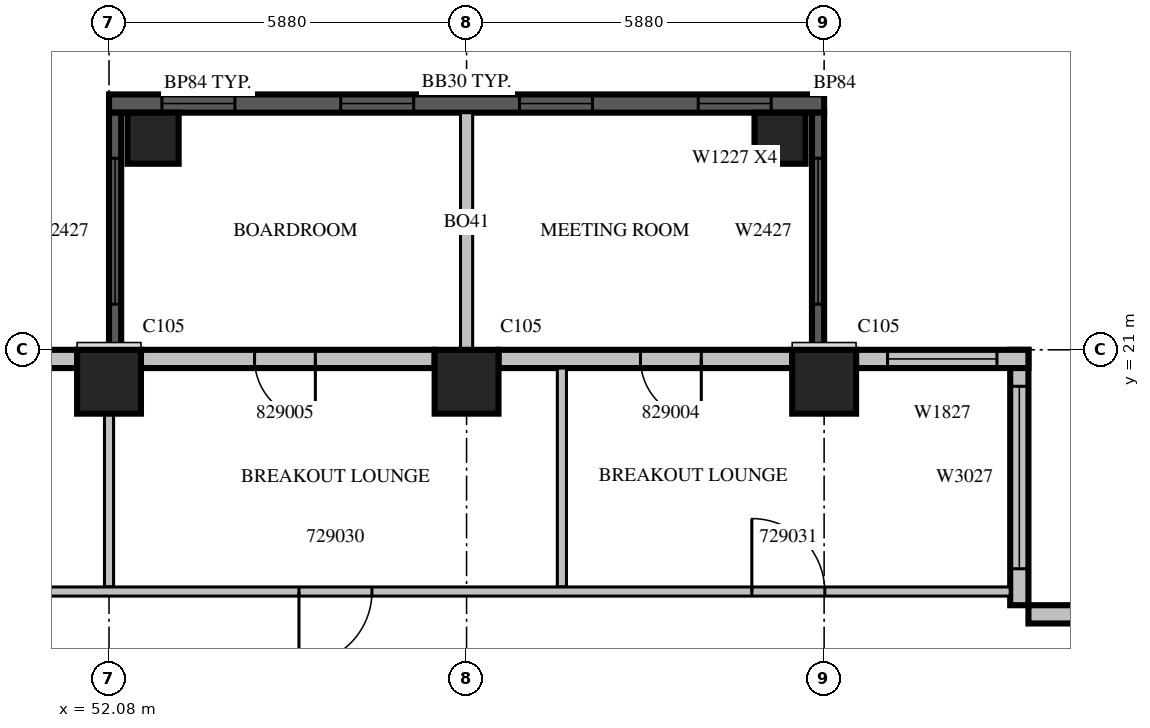
"""IFC4 building model, lengths in metres.
Left out: names, types, materials, properties, quantities, classifications, styles, units other than length and angle.
Written with IfcOpenShell. Run it as: python <this file> out.ifc"""

import sys

from ifc_helpers import new_model, si_unit, direction, frame, frame_2d, origin, origin_2d, place, context, subcontext, project, spatial, rectangle, extrude, source, transform, mapped, element, fill, save


model = new_model("IFC4")
c1 = context("Model", 3, precision=1e-05, world=origin(), true_north=direction((0.0, 1.0)))
c2 = subcontext(c1, "Body", "Model", "MODEL_VIEW")
j1 = project(units=[si_unit("LENGTHUNIT", "METRE"), si_unit("PLANEANGLEUNIT", "RADIAN")], contexts=[c1])
p1 = place(None, origin())
s1 = spatial("IfcSite", under=j1, at=p1, CompositionType="ELEMENT")
p2 = place(p1, origin())
s2 = spatial("IfcBuilding", under=s1, at=p2, CompositionType="ELEMENT")
p3 = place(p2, frame((0.0, 0.0, 132.9)))
s3 = spatial("IfcBuildingStorey", under=s2, at=p3, CompositionType="ELEMENT", Elevation=132.9)
m1 = source(origin(), c2, "Body", "SweptSolid", [
    extrude(rectangle(XDim=1.05, YDim=1.05, at=origin_2d()), origin(), (0.0, 0.0, 1.0), 4.2),
])
for number, where, z_axis, x_axis in (
    (1, (52.08, 20.475, 0.0), (0.0, 0.0, 1.0), (1.0, 0.0, 0.0)),
    (2, (57.96, 20.475, 0.0), (0.0, 0.0, 1.0), (1.0, 0.0, 0.0)),
    (3, (63.84, 20.475, 0.0), (0.0, 0.0, 1.0), (1.0, 0.0, 0.0)),
):
    element("IfcColumn", number, at=place(p3, frame(where, z_axis=z_axis, x_axis=x_axis)), inside=s3, PredefinedType="COLUMN", context=c2, shape_type="MappedRepresentation", body=[
        mapped(m1, transform((0.0, 0.0, 0.0), scale=1.0)),
    ])
m2 = source(origin(), c2, "Body", "SweptSolid", [
    extrude(rectangle(XDim=0.84, YDim=0.84, at=origin_2d()), origin(), (0.0, 0.0, 1.0), 4.2),
])
for number, where, z_axis, x_axis in (
    (4, (52.805, 24.48, 0.0), (0.0, 0.0, 1.0), (1.0, 0.0, 0.0)),
    (5, (63.115, 24.48, 0.0), (0.0, 0.0, 1.0), (1.0, 0.0, 0.0)),
):
    element("IfcColumn", number, at=place(p3, frame(where, z_axis=z_axis, x_axis=x_axis)), inside=s3, PredefinedType="COLUMN", context=c2, shape_type="MappedRepresentation", body=[
        mapped(m2, transform((0.0, 0.0, 0.0), scale=1.0)),
    ])
m3 = source(origin(), c2, "Body", "SweptSolid", [
    extrude(rectangle(XDim=11.76, YDim=0.3, at=frame_2d((5.88, 0.0))), origin(), (0.0, 0.0, 1.0), 3.79),
])
p4 = place(p3, frame((63.84, 25.05, 0.0), z_axis=(0.0, 0.0, 1.0), x_axis=(-1.0, 0.0, 0.0)))
e6 = element("IfcWall", 6, at=p4, inside=s3, PredefinedType="SOLIDWALL", context=c2, shape_type="MappedRepresentation", body=[
    mapped(m3, transform((0.0, 0.0, 0.0), scale=1.0)),
])
m4 = source(origin(), c2, "Body", "SweptSolid", [
    extrude(rectangle(XDim=1.2, YDim=2.7, at=frame_2d((0.6, 1.35))), frame((0.0, 0.16, 0.0), z_axis=(0.0, -1.0, 0.0), x_axis=(1.0, 0.0, 0.0)), (0.0, 0.0, 1.0), 0.32),
])
p5 = place(p4, frame((0.87, 0.0, 0.6)))
e7 = element("IfcOpeningElement", 7, at=p5, cuts=e6, PredefinedType="OPENING", context=c2, shape_type="MappedRepresentation", body=[
    mapped(m4, transform((0.0, 0.0, 0.0), scale=1.0)),
])
p6 = place(p4, frame((3.81, 0.0, 0.6)))
e8 = element("IfcOpeningElement", 8, at=p6, cuts=e6, PredefinedType="OPENING", context=c2, shape_type="MappedRepresentation", body=[
    mapped(m4, transform((0.0, 0.0, 0.0), scale=1.0)),
])
p7 = place(p4, frame((6.75, 0.0, 0.6)))
e9 = element("IfcOpeningElement", 9, at=p7, cuts=e6, PredefinedType="OPENING", context=c2, shape_type="MappedRepresentation", body=[
    mapped(m4, transform((0.0, 0.0, 0.0), scale=1.0)),
])
p8 = place(p4, frame((9.69, 0.0, 0.6)))
e10 = element("IfcOpeningElement", 10, at=p8, cuts=e6, PredefinedType="OPENING", context=c2, shape_type="MappedRepresentation", body=[
    mapped(m4, transform((0.0, 0.0, 0.0), scale=1.0)),
])
m5 = source(origin(), c2, "Body", "SweptSolid", [
    extrude(rectangle(XDim=3.9, YDim=0.2, at=frame_2d((1.95, 0.0))), origin(), (0.0, 0.0, 1.0), 3.79),
])
p9 = place(p3, frame((57.96, 21.0, 0.0), z_axis=(0.0, 0.0, 1.0), x_axis=(0.0, 1.0, 0.0)))
e11 = element("IfcWall", 11, at=p9, inside=s3, PredefinedType="SOLIDWALL", context=c2, shape_type="MappedRepresentation", body=[
    mapped(m5, transform((0.0, 0.0, 0.0), scale=1.0)),
])
m6 = source(origin(), c2, "Body", "SweptSolid", [
    extrude(rectangle(XDim=3.9, YDim=0.2, at=frame_2d((1.95, 0.0))), origin(), (0.0, 0.0, 1.0), 3.79),
])
p10 = place(p3, frame((63.74, 21.0, 0.0), z_axis=(0.0, 0.0, 1.0), x_axis=(0.0, 1.0, 0.0)))
e12 = element("IfcWall", 12, at=p10, inside=s3, PredefinedType="SOLIDWALL", context=c2, shape_type="MappedRepresentation", body=[
    mapped(m6, transform((0.0, 0.0, 0.0), scale=1.0)),
])
m7 = source(origin(), c2, "Body", "SweptSolid", [
    extrude(rectangle(XDim=2.4, YDim=2.7, at=frame_2d((1.2, 1.35))), frame((0.0, 0.11, 0.0), z_axis=(0.0, -1.0, 0.0), x_axis=(1.0, 0.0, 0.0)), (0.0, 0.0, 1.0), 0.22),
])
p11 = place(p10, frame((0.75, 0.0, 0.6)))
e13 = element("IfcOpeningElement", 13, at=p11, cuts=e12, PredefinedType="OPENING", context=c2, shape_type="MappedRepresentation", body=[
    mapped(m7, transform((0.0, 0.0, 0.0), scale=1.0)),
])
p12 = place(p3, frame((52.18, 21.0, 0.0), z_axis=(0.0, 0.0, 1.0), x_axis=(0.0, 1.0, 0.0)))
e14 = element("IfcWall", 14, at=p12, inside=s3, PredefinedType="SOLIDWALL", context=c2, shape_type="MappedRepresentation", body=[
    mapped(m6, transform((0.0, 0.0, 0.0), scale=1.0)),
])
p13 = place(p12, frame((0.75, 0.0, 0.6)))
e15 = element("IfcOpeningElement", 15, at=p13, cuts=e14, PredefinedType="OPENING", context=c2, shape_type="MappedRepresentation", body=[
    mapped(m7, transform((0.0, 0.0, 0.0), scale=1.0)),
])
m8 = source(origin(), c2, "Body", "SweptSolid", [
    extrude(rectangle(XDim=4.2, YDim=0.3, at=frame_2d((2.1, 0.0))), origin(), (0.0, 0.0, 1.0), 3.8),
])
p14 = place(p3, frame((71.4, 16.65, 0.0), z_axis=(0.0, 0.0, 1.0), x_axis=(-1.0, 0.0, 0.0)))
e16 = element("IfcWall", 16, at=p14, inside=s3, PredefinedType="STANDARD", context=c2, shape_type="MappedRepresentation", body=[
    mapped(m8, transform((0.0, 0.0, 0.0), scale=1.0)),
])
p15 = place(p14, frame((0.66, 0.0, 0.6)))
e17 = element("IfcOpeningElement", 17, at=p15, cuts=e16, PredefinedType="OPENING", context=c2, shape_type="MappedRepresentation", body=[
    mapped(m4, transform((0.0, 0.0, 0.0), scale=1.0)),
])
p16 = place(p3, frame((67.05, 16.8, 0.0), z_axis=(0.0, 0.0, 1.0), x_axis=(0.0, 1.0, 0.0)))
e18 = element("IfcWall", 18, at=p16, inside=s3, PredefinedType="STANDARD", context=c2, shape_type="MappedRepresentation", body=[
    mapped(m8, transform((0.0, 0.0, 0.0), scale=1.0)),
])
m9 = source(origin(), c2, "Body", "SweptSolid", [
    extrude(rectangle(XDim=3.0, YDim=2.7, at=frame_2d((1.5, 1.35))), frame((0.0, 0.16, 0.0), z_axis=(0.0, -1.0, 0.0), x_axis=(1.0, 0.0, 0.0)), (0.0, 0.0, 1.0), 0.32),
])
p17 = place(p16, frame((0.6, 0.0, 0.6)))
e19 = element("IfcOpeningElement", 19, at=p17, cuts=e18, PredefinedType="OPENING", context=c2, shape_type="MappedRepresentation", body=[
    mapped(m9, transform((0.0, 0.0, 0.0), scale=1.0)),
])
m10 = source(origin(), c2, "Body", "SweptSolid", [
    extrude(rectangle(XDim=2.835, YDim=0.3, at=frame_2d((1.417, 0.0))), origin(), (0.0, 0.0, 1.0), 3.8),
])
p18 = place(p3, frame((67.2, 20.85, 0.0), z_axis=(0.0, 0.0, 1.0), x_axis=(-1.0, 0.0, 0.0)))
e20 = element("IfcWall", 20, at=p18, inside=s3, PredefinedType="STANDARD", context=c2, shape_type="MappedRepresentation", body=[
    mapped(m10, transform((0.0, 0.0, 0.0), scale=1.0)),
])
m11 = source(origin(), c2, "Body", "SweptSolid", [
    extrude(rectangle(XDim=1.8, YDim=2.7, at=frame_2d((0.9, 1.35))), frame((0.0, 0.16, 0.0), z_axis=(0.0, -1.0, 0.0), x_axis=(1.0, 0.0, 0.0)), (0.0, 0.0, 1.0), 0.32),
])
p19 = place(p18, frame((0.517, 0.0, 0.6)))
e21 = element("IfcOpeningElement", 21, at=p19, cuts=e20, PredefinedType="OPENING", context=c2, shape_type="MappedRepresentation", body=[
    mapped(m11, transform((0.0, 0.0, 0.0), scale=1.0)),
])
m12 = source(origin(), c2, "Body", "SweptSolid", [
    extrude(rectangle(XDim=4.83, YDim=0.3, at=frame_2d((2.415, 0.0))), origin(), (0.0, 0.0, 1.0), 3.8),
])
p20 = place(p3, frame((63.315, 20.85, 0.0), z_axis=(0.0, 0.0, 1.0), x_axis=(-1.0, 0.0, 0.0)))
e22 = element("IfcWall", 22, at=p20, inside=s3, PredefinedType="STANDARD", context=c2, shape_type="MappedRepresentation", body=[
    mapped(m12, transform((0.0, 0.0, 0.0), scale=1.0)),
])
m13 = source(origin(), c2, "Body", "SweptSolid", [
    extrude(rectangle(XDim=1.0, YDim=2.1, at=frame_2d((0.5, 1.05))), frame((0.0, 0.16, 0.0), z_axis=(0.0, -1.0, 0.0), x_axis=(1.0, 0.0, 0.0)), (0.0, 0.0, 1.0), 0.32),
])
p21 = place(p20, frame((1.495, 0.0, 0.0)))
e23 = element("IfcOpeningElement", 23, at=p21, cuts=e22, PredefinedType="OPENING", context=c2, shape_type="MappedRepresentation", body=[
    mapped(m13, transform((0.0, 0.0, 0.0), scale=1.0)),
])
p22 = place(p3, frame((57.435, 20.85, 0.0), z_axis=(0.0, 0.0, 1.0), x_axis=(-1.0, 0.0, 0.0)))
e24 = element("IfcWall", 24, at=p22, inside=s3, PredefinedType="STANDARD", context=c2, shape_type="MappedRepresentation", body=[
    mapped(m12, transform((0.0, 0.0, 0.0), scale=1.0)),
])
p23 = place(p22, frame((1.962, 0.0, 0.0)))
e25 = element("IfcOpeningElement", 25, at=p23, cuts=e24, PredefinedType="OPENING", context=c2, shape_type="MappedRepresentation", body=[
    mapped(m13, transform((0.0, 0.0, 0.0), scale=1.0)),
])
p24 = place(p3, frame((51.555, 20.85, 0.0), z_axis=(0.0, 0.0, 1.0), x_axis=(-1.0, 0.0, 0.0)))
e26 = element("IfcWall", 26, at=p24, inside=s3, PredefinedType="STANDARD", context=c2, shape_type="MappedRepresentation", body=[
    mapped(m12, transform((0.0, 0.0, 0.0), scale=1.0)),
])
p25 = place(p24, frame((2.297, 0.0, 0.6)))
e27 = element("IfcOpeningElement", 27, at=p25, cuts=e26, PredefinedType="OPENING", context=c2, shape_type="MappedRepresentation", body=[
    mapped(m11, transform((0.0, 0.0, 0.0), scale=1.0)),
])
m14 = source(origin(), c2, "Body", "SweptSolid", [
    extrude(rectangle(XDim=3.6, YDim=0.15, at=frame_2d((1.8, 0.0))), origin(), (0.0, 0.0, 1.0), 3.8),
])
p26 = place(p3, frame((59.528, 20.7, 0.0), z_axis=(0.0, 0.0, 1.0), x_axis=(0.0, -1.0, 0.0)))
e28 = element("IfcWall", 28, at=p26, inside=s3, PredefinedType="PARTITIONING", context=c2, shape_type="MappedRepresentation", body=[
    mapped(m14, transform((0.0, 0.0, 0.0), scale=1.0)),
])
m15 = source(origin(), c2, "Body", "SweptSolid", [
    extrude(rectangle(XDim=2.851, YDim=0.15, at=frame_2d((1.425, 0.0))), origin(), (0.0, 0.0, 1.0), 3.8),
])
p27 = place(p3, frame((52.08, 17.1, 0.0), z_axis=(0.0, 0.0, 1.0), x_axis=(0.0, 1.0, 0.0)))
e29 = element("IfcWall", 29, at=p27, inside=s3, PredefinedType="PARTITIONING", context=c2, shape_type="MappedRepresentation", body=[
    mapped(m15, transform((0.0, 0.0, 0.0), scale=1.0)),
])
m16 = source(origin(), c2, "Body", "SweptSolid", [
    extrude(rectangle(XDim=37.5, YDim=0.15, at=frame_2d((18.75, 0.0))), origin(), (0.0, 0.0, 1.0), 3.3),
])
p28 = place(p3, frame((29.4, 17.025, 0.0), z_axis=(0.0, 0.0, 1.0), x_axis=(1.0, 0.0, 0.0)))
e30 = element("IfcWall", 30, at=p28, inside=s3, PredefinedType="PARTITIONING", context=c2, shape_type="MappedRepresentation", body=[
    mapped(m16, transform((0.0, 0.0, 0.0), scale=1.0)),
])
m17 = source(origin(), c2, "Body", "SweptSolid", [
    extrude(rectangle(XDim=1.0, YDim=2.1, at=frame_2d((0.5, 1.05))), frame((0.0, 0.085, 0.0), z_axis=(0.0, -1.0, 0.0), x_axis=(1.0, 0.0, 0.0)), (0.0, 0.0, 1.0), 0.17),
])
p29 = place(p28, frame((1.357, 0.0, 0.0)))
e31 = element("IfcOpeningElement", 31, at=p29, cuts=e30, PredefinedType="OPENING", context=c2, shape_type="MappedRepresentation", body=[
    mapped(m17, transform((0.0, 0.0, 0.0), scale=1.0)),
])
p30 = place(p28, frame((4.669, 0.0, 0.0)))
e32 = element("IfcOpeningElement", 32, at=p30, cuts=e30, PredefinedType="OPENING", context=c2, shape_type="MappedRepresentation", body=[
    mapped(m17, transform((0.0, 0.0, 0.0), scale=1.0)),
])
p31 = place(p28, frame((7.012, 0.0, 0.0)))
e33 = element("IfcOpeningElement", 33, at=p31, cuts=e30, PredefinedType="OPENING", context=c2, shape_type="MappedRepresentation", body=[
    mapped(m17, transform((0.0, 0.0, 0.0), scale=1.0)),
])
m18 = source(origin(), c2, "Body", "SweptSolid", [
    extrude(rectangle(XDim=0.9, YDim=2.1, at=frame_2d((0.45, 1.05))), frame((0.0, 0.085, 0.0), z_axis=(0.0, -1.0, 0.0), x_axis=(1.0, 0.0, 0.0)), (0.0, 0.0, 1.0), 0.17),
])
p32 = place(p28, frame((9.158, 0.0, 0.0)))
e34 = element("IfcOpeningElement", 34, at=p32, cuts=e30, PredefinedType="OPENING", context=c2, shape_type="MappedRepresentation", body=[
    mapped(m18, transform((0.0, 0.0, 0.0), scale=1.0)),
])
p33 = place(p28, frame((11.258, 0.0, 0.0)))
e35 = element("IfcOpeningElement", 35, at=p33, cuts=e30, PredefinedType="OPENING", context=c2, shape_type="MappedRepresentation", body=[
    mapped(m18, transform((0.0, 0.0, 0.0), scale=1.0)),
])
m19 = source(origin(), c2, "Body", "SweptSolid", [
    extrude(rectangle(XDim=1.2, YDim=2.1, at=frame_2d((0.6, 1.05))), frame((0.0, 0.085, 0.0), z_axis=(0.0, -1.0, 0.0), x_axis=(1.0, 0.0, 0.0)), (0.0, 0.0, 1.0), 0.17),
])
p34 = place(p28, frame((14.52, 0.0, 0.0)))
e36 = element("IfcOpeningElement", 36, at=p34, cuts=e30, PredefinedType="OPENING", context=c2, shape_type="MappedRepresentation", body=[
    mapped(m19, transform((0.0, 0.0, 0.0), scale=1.0)),
])
p35 = place(p28, frame((19.56, 0.0, 0.0)))
e37 = element("IfcOpeningElement", 37, at=p35, cuts=e30, PredefinedType="OPENING", context=c2, shape_type="MappedRepresentation", body=[
    mapped(m19, transform((0.0, 0.0, 0.0), scale=1.0)),
])
p36 = place(p28, frame((25.804, 0.0, 0.0)))
e38 = element("IfcOpeningElement", 38, at=p36, cuts=e30, PredefinedType="OPENING", context=c2, shape_type="MappedRepresentation", body=[
    mapped(m19, transform((0.0, 0.0, 0.0), scale=1.0)),
])
p37 = place(p28, frame((33.251, 0.0, 0.0)))
e39 = element("IfcOpeningElement", 39, at=p37, cuts=e30, PredefinedType="OPENING", context=c2, shape_type="MappedRepresentation", body=[
    mapped(m19, transform((0.0, 0.0, 0.0), scale=1.0)),
])
m20 = source(origin(), c2, "Body", "SweptSolid", [
    extrude(rectangle(XDim=1.2, YDim=2.7, at=frame_2d((0.6, 1.35))), frame((0.0, 0.03, 0.0), z_axis=(0.0, -1.0, 0.0), x_axis=(1.0, 0.0, 0.0)), (0.0, 0.0, 1.0), 0.06),
])
p38 = place(p5, origin())
e40 = element("IfcWindow", 40, at=p38, inside=s3, PartitioningType="SINGLE_PANEL", PredefinedType="WINDOW", context=c2, shape_type="MappedRepresentation", body=[
    mapped(m20, transform((0.0, 0.0, 0.0), scale=1.0)),
])
fill(e7, e40)
p39 = place(p6, origin())
e41 = element("IfcWindow", 41, at=p39, inside=s3, PartitioningType="SINGLE_PANEL", PredefinedType="WINDOW", context=c2, shape_type="MappedRepresentation", body=[
    mapped(m20, transform((0.0, 0.0, 0.0), scale=1.0)),
])
fill(e8, e41)
p40 = place(p7, origin())
e42 = element("IfcWindow", 42, at=p40, inside=s3, PartitioningType="SINGLE_PANEL", PredefinedType="WINDOW", context=c2, shape_type="MappedRepresentation", body=[
    mapped(m20, transform((0.0, 0.0, 0.0), scale=1.0)),
])
fill(e9, e42)
p41 = place(p8, origin())
e43 = element("IfcWindow", 43, at=p41, inside=s3, PartitioningType="SINGLE_PANEL", PredefinedType="WINDOW", context=c2, shape_type="MappedRepresentation", body=[
    mapped(m20, transform((0.0, 0.0, 0.0), scale=1.0)),
])
fill(e10, e43)
m21 = source(origin(), c2, "Body", "SweptSolid", [
    extrude(rectangle(XDim=2.4, YDim=2.7, at=frame_2d((1.2, 1.35))), frame((0.0, 0.03, 0.0), z_axis=(0.0, -1.0, 0.0), x_axis=(1.0, 0.0, 0.0)), (0.0, 0.0, 1.0), 0.06),
])
p42 = place(p11, origin())
e44 = element("IfcWindow", 44, at=p42, inside=s3, PartitioningType="SINGLE_PANEL", PredefinedType="WINDOW", context=c2, shape_type="MappedRepresentation", body=[
    mapped(m21, transform((0.0, 0.0, 0.0), scale=1.0)),
])
fill(e13, e44)
p43 = place(p13, origin())
e45 = element("IfcWindow", 45, at=p43, inside=s3, PartitioningType="SINGLE_PANEL", PredefinedType="WINDOW", context=c2, shape_type="MappedRepresentation", body=[
    mapped(m21, transform((0.0, 0.0, 0.0), scale=1.0)),
])
fill(e15, e45)
m22 = source(origin(), c2, "Body", "SweptSolid", [
    extrude(rectangle(XDim=3.0, YDim=2.7, at=frame_2d((1.5, 1.35))), frame((0.0, 0.03, 0.0), z_axis=(0.0, -1.0, 0.0), x_axis=(1.0, 0.0, 0.0)), (0.0, 0.0, 1.0), 0.06),
])
p44 = place(p17, origin())
e46 = element("IfcWindow", 46, at=p44, inside=s3, PartitioningType="SINGLE_PANEL", PredefinedType="WINDOW", context=c2, shape_type="MappedRepresentation", body=[
    mapped(m22, transform((0.0, 0.0, 0.0), scale=1.0)),
])
fill(e19, e46)
m23 = source(origin(), c2, "Body", "SweptSolid", [
    extrude(rectangle(XDim=1.8, YDim=2.7, at=frame_2d((0.9, 1.35))), frame((0.0, 0.03, 0.0), z_axis=(0.0, -1.0, 0.0), x_axis=(1.0, 0.0, 0.0)), (0.0, 0.0, 1.0), 0.06),
])
p45 = place(p19, origin())
e47 = element("IfcWindow", 47, at=p45, inside=s3, PartitioningType="SINGLE_PANEL", PredefinedType="WINDOW", context=c2, shape_type="MappedRepresentation", body=[
    mapped(m23, transform((0.0, 0.0, 0.0), scale=1.0)),
])
fill(e21, e47)
m24 = source(origin(), c2, "Body", "SweptSolid", [
    extrude(rectangle(XDim=1.2, YDim=2.1, at=frame_2d((0.6, 1.05))), frame((0.0, 0.025, 0.0), z_axis=(0.0, -1.0, 0.0), x_axis=(1.0, 0.0, 0.0)), (0.0, 0.0, 1.0), 0.05),
])
p46 = place(p36, origin())
e48 = element("IfcDoor", 48, at=p46, inside=s3, OperationType="SINGLE_SWING_RIGHT", PredefinedType="DOOR", context=c2, shape_type="MappedRepresentation", body=[
    mapped(m24, transform((0.0, 0.0, 0.0), scale=1.0)),
])
fill(e38, e48)
p47 = place(p37, origin())
e49 = element("IfcDoor", 49, at=p47, inside=s3, OperationType="SINGLE_SWING_LEFT", PredefinedType="DOOR", context=c2, shape_type="MappedRepresentation", body=[
    mapped(m24, transform((0.0, 0.0, 0.0), scale=1.0)),
])
fill(e39, e49)
m25 = source(origin(), c2, "Body", "SweptSolid", [
    extrude(rectangle(XDim=1.0, YDim=2.1, at=frame_2d((0.5, 1.05))), frame((0.0, 0.025, 0.0), z_axis=(0.0, -1.0, 0.0), x_axis=(1.0, 0.0, 0.0)), (0.0, 0.0, 1.0), 0.05),
])
p48 = place(p21, origin())
e50 = element("IfcDoor", 50, at=p48, inside=s3, OperationType="SINGLE_SWING_LEFT", PredefinedType="DOOR", context=c2, shape_type="MappedRepresentation", body=[
    mapped(m25, transform((0.0, 0.0, 0.0), scale=1.0)),
])
fill(e23, e50)
p49 = place(p23, origin())
e51 = element("IfcDoor", 51, at=p49, inside=s3, OperationType="SINGLE_SWING_LEFT", PredefinedType="DOOR", context=c2, shape_type="MappedRepresentation", body=[
    mapped(m25, transform((0.0, 0.0, 0.0), scale=1.0)),
])
fill(e25, e51)
save(model, sys.argv[1])
